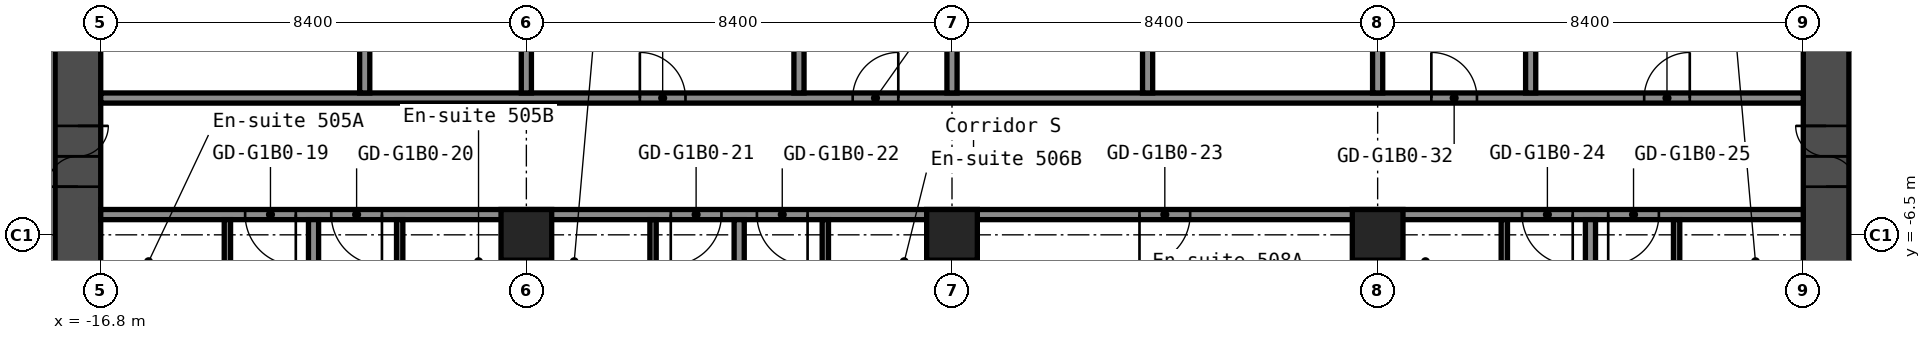
"""IFC4 building model, lengths in metres.
Left out: names, types, materials, properties, quantities, classifications, styles, units other than length and angle.
Written with IfcOpenShell. Run it as: python <this file> out.ifc"""

import sys

from ifc_helpers import new_model, si_unit, direction, frame, frame_2d, origin, origin_2d, place, context, subcontext, project, spatial, rectangle, hollow_rectangle, extrude, element, fill, save


model = new_model("IFC4")
c1 = context("Model", 3, precision=1e-05, world=origin(), true_north=direction((0.0, 1.0)))
c2 = subcontext(c1, "Body", "Model", "MODEL_VIEW")
j1 = project(units=[si_unit("LENGTHUNIT", "METRE"), si_unit("PLANEANGLEUNIT", "RADIAN")], contexts=[c1])
p1 = place(None, origin())
s1 = spatial("IfcSite", under=j1, at=p1, CompositionType="ELEMENT")
p2 = place(p1, origin())
s2 = spatial("IfcBuilding", under=s1, at=p2, CompositionType="ELEMENT")
p3 = place(p2, frame((0.0, 0.0, 23.0)))
s3 = spatial("IfcBuildingStorey", under=s2, at=p3, CompositionType="ELEMENT", Elevation=23.0)
for number, where, z_axis, x_axis in (
    (1, (-8.4, -6.5, 0.0), (0.0, 0.0, 1.0), (1.0, 0.0, 0.0)),
    (2, (0.0, -6.5, 0.0), (0.0, 0.0, 1.0), (1.0, 0.0, 0.0)),
    (3, (8.4, -6.5, 0.0), (0.0, 0.0, 1.0), (1.0, 0.0, 0.0)),
):
    element("IfcColumn", number, at=place(p3, frame(where, z_axis=z_axis, x_axis=x_axis)), inside=s3, PredefinedType="COLUMN", context=c2, shape_type="SweptSolid", body=[
        extrude(hollow_rectangle(XDim=1.0, YDim=1.0, WallThickness=0.04, at=origin_2d()), origin(), (0.0, 0.0, 1.0), 2.8),
    ])
p4 = place(p3, frame((-17.25, -8.4, 0.0), z_axis=(0.0, 0.0, 1.0), x_axis=(0.0, 1.0, 0.0)))
e4 = element("IfcWall", 4, at=p4, inside=s3, PredefinedType="SHEAR", context=c2, shape_type="SweptSolid", body=[
    extrude(rectangle(XDim=16.8, YDim=0.9, at=frame_2d((8.4, 0.0))), origin(), (0.0, 0.0, 1.0), 2.8),
])
p5 = place(p4, frame((12.75, 0.0, 0.0)))
e5 = element("IfcOpeningElement", 5, at=p5, cuts=e4, PredefinedType="OPENING", context=c2, shape_type="SweptSolid", body=[
    extrude(rectangle(XDim=1.2, YDim=2.1, at=frame_2d((0.6, 1.05))), frame((0.0, 0.46, 0.0), z_axis=(0.0, -1.0, 0.0), x_axis=(1.0, 0.0, 0.0)), (0.0, 0.0, 1.0), 0.92),
])
p6 = place(p4, frame((2.85, 0.0, 0.0)))
e6 = element("IfcOpeningElement", 6, at=p6, cuts=e4, PredefinedType="OPENING", context=c2, shape_type="SweptSolid", body=[
    extrude(rectangle(XDim=1.2, YDim=2.1, at=frame_2d((0.6, 1.05))), frame((0.0, 0.46, 0.0), z_axis=(0.0, -1.0, 0.0), x_axis=(1.0, 0.0, 0.0)), (0.0, 0.0, 1.0), 0.92),
])
p7 = place(p3, frame((17.25, -8.4, 0.0), z_axis=(0.0, 0.0, 1.0), x_axis=(0.0, 1.0, 0.0)))
e7 = element("IfcWall", 7, at=p7, inside=s3, PredefinedType="SHEAR", context=c2, shape_type="SweptSolid", body=[
    extrude(rectangle(XDim=16.8, YDim=0.9, at=frame_2d((8.4, 0.0))), origin(), (0.0, 0.0, 1.0), 2.8),
])
p8 = place(p7, frame((12.75, 0.0, 0.0)))
e8 = element("IfcOpeningElement", 8, at=p8, cuts=e7, PredefinedType="OPENING", context=c2, shape_type="SweptSolid", body=[
    extrude(rectangle(XDim=1.2, YDim=2.1, at=frame_2d((0.6, 1.05))), frame((0.0, 0.46, 0.0), z_axis=(0.0, -1.0, 0.0), x_axis=(1.0, 0.0, 0.0)), (0.0, 0.0, 1.0), 0.92),
])
p9 = place(p7, frame((2.85, 0.0, 0.0)))
e9 = element("IfcOpeningElement", 9, at=p9, cuts=e7, PredefinedType="OPENING", context=c2, shape_type="SweptSolid", body=[
    extrude(rectangle(XDim=1.2, YDim=2.1, at=frame_2d((0.6, 1.05))), frame((0.0, 0.46, 0.0), z_axis=(0.0, -1.0, 0.0), x_axis=(1.0, 0.0, 0.0)), (0.0, 0.0, 1.0), 0.92),
])
p10 = place(p3, frame((-16.8, -6.1, 0.0), z_axis=(0.0, 0.0, 1.0), x_axis=(1.0, 0.0, 0.0)))
e10 = element("IfcWall", 10, at=p10, inside=s3, PredefinedType="PARTITIONING", context=c2, shape_type="SweptSolid", body=[
    extrude(rectangle(XDim=33.6, YDim=0.2, at=frame_2d((16.8, 0.0))), origin(), (0.0, 0.0, 1.0), 2.8),
])
p11 = place(p10, frame((2.85, 0.0, 0.0)))
e11 = element("IfcOpeningElement", 11, at=p11, cuts=e10, PredefinedType="OPENING", context=c2, shape_type="SweptSolid", body=[
    extrude(rectangle(XDim=1.0, YDim=2.1, at=frame_2d((0.5, 1.05))), frame((0.0, 0.11, 0.0), z_axis=(0.0, -1.0, 0.0), x_axis=(1.0, 0.0, 0.0)), (0.0, 0.0, 1.0), 0.22),
])
p12 = place(p10, frame((4.55, 0.0, 0.0)))
e12 = element("IfcOpeningElement", 12, at=p12, cuts=e10, PredefinedType="OPENING", context=c2, shape_type="SweptSolid", body=[
    extrude(rectangle(XDim=1.0, YDim=2.1, at=frame_2d((0.5, 1.05))), frame((0.0, 0.11, 0.0), z_axis=(0.0, -1.0, 0.0), x_axis=(1.0, 0.0, 0.0)), (0.0, 0.0, 1.0), 0.22),
])
p13 = place(p10, frame((11.25, 0.0, 0.0)))
e13 = element("IfcOpeningElement", 13, at=p13, cuts=e10, PredefinedType="OPENING", context=c2, shape_type="SweptSolid", body=[
    extrude(rectangle(XDim=1.0, YDim=2.1, at=frame_2d((0.5, 1.05))), frame((0.0, 0.11, 0.0), z_axis=(0.0, -1.0, 0.0), x_axis=(1.0, 0.0, 0.0)), (0.0, 0.0, 1.0), 0.22),
])
p14 = place(p10, frame((12.95, 0.0, 0.0)))
e14 = element("IfcOpeningElement", 14, at=p14, cuts=e10, PredefinedType="OPENING", context=c2, shape_type="SweptSolid", body=[
    extrude(rectangle(XDim=1.0, YDim=2.1, at=frame_2d((0.5, 1.05))), frame((0.0, 0.11, 0.0), z_axis=(0.0, -1.0, 0.0), x_axis=(1.0, 0.0, 0.0)), (0.0, 0.0, 1.0), 0.22),
])
p15 = place(p10, frame((20.5, 0.0, 0.0)))
e15 = element("IfcOpeningElement", 15, at=p15, cuts=e10, PredefinedType="OPENING", context=c2, shape_type="SweptSolid", body=[
    extrude(rectangle(XDim=1.0, YDim=2.1, at=frame_2d((0.5, 1.05))), frame((0.0, 0.11, 0.0), z_axis=(0.0, -1.0, 0.0), x_axis=(1.0, 0.0, 0.0)), (0.0, 0.0, 1.0), 0.22),
])
p16 = place(p10, frame((28.05, 0.0, 0.0)))
e16 = element("IfcOpeningElement", 16, at=p16, cuts=e10, PredefinedType="OPENING", context=c2, shape_type="SweptSolid", body=[
    extrude(rectangle(XDim=1.0, YDim=2.1, at=frame_2d((0.5, 1.05))), frame((0.0, 0.11, 0.0), z_axis=(0.0, -1.0, 0.0), x_axis=(1.0, 0.0, 0.0)), (0.0, 0.0, 1.0), 0.22),
])
p17 = place(p10, frame((29.75, 0.0, 0.0)))
e17 = element("IfcOpeningElement", 17, at=p17, cuts=e10, PredefinedType="OPENING", context=c2, shape_type="SweptSolid", body=[
    extrude(rectangle(XDim=1.0, YDim=2.1, at=frame_2d((0.5, 1.05))), frame((0.0, 0.11, 0.0), z_axis=(0.0, -1.0, 0.0), x_axis=(1.0, 0.0, 0.0)), (0.0, 0.0, 1.0), 0.22),
])
p18 = place(p3, frame((-16.8, -3.8, 0.0), z_axis=(0.0, 0.0, 1.0), x_axis=(1.0, 0.0, 0.0)))
e18 = element("IfcWall", 18, at=p18, inside=s3, PredefinedType="PARTITIONING", context=c2, shape_type="SweptSolid", body=[
    extrude(rectangle(XDim=33.6, YDim=0.2, at=frame_2d((16.8, 0.0))), origin(), (0.0, 0.0, 1.0), 2.8),
])
p19 = place(p18, frame((10.64, 0.0, 0.0)))
e19 = element("IfcOpeningElement", 19, at=p19, cuts=e18, PredefinedType="OPENING", context=c2, shape_type="SweptSolid", body=[
    extrude(rectangle(XDim=0.9, YDim=2.1, at=frame_2d((0.45, 1.05))), frame((0.0, 0.11, 0.0), z_axis=(0.0, -1.0, 0.0), x_axis=(1.0, 0.0, 0.0)), (0.0, 0.0, 1.0), 0.22),
])
p20 = place(p18, frame((14.84, 0.0, 0.0)))
e20 = element("IfcOpeningElement", 20, at=p20, cuts=e18, PredefinedType="OPENING", context=c2, shape_type="SweptSolid", body=[
    extrude(rectangle(XDim=0.9, YDim=2.1, at=frame_2d((0.45, 1.05))), frame((0.0, 0.11, 0.0), z_axis=(0.0, -1.0, 0.0), x_axis=(1.0, 0.0, 0.0)), (0.0, 0.0, 1.0), 0.22),
])
p21 = place(p18, frame((26.26, 0.0, 0.0)))
e21 = element("IfcOpeningElement", 21, at=p21, cuts=e18, PredefinedType="OPENING", context=c2, shape_type="SweptSolid", body=[
    extrude(rectangle(XDim=0.9, YDim=2.1, at=frame_2d((0.45, 1.05))), frame((0.0, 0.11, 0.0), z_axis=(0.0, -1.0, 0.0), x_axis=(1.0, 0.0, 0.0)), (0.0, 0.0, 1.0), 0.22),
])
p22 = place(p18, frame((30.46, 0.0, 0.0)))
e22 = element("IfcOpeningElement", 22, at=p22, cuts=e18, PredefinedType="OPENING", context=c2, shape_type="SweptSolid", body=[
    extrude(rectangle(XDim=0.9, YDim=2.1, at=frame_2d((0.45, 1.05))), frame((0.0, 0.11, 0.0), z_axis=(0.0, -1.0, 0.0), x_axis=(1.0, 0.0, 0.0)), (0.0, 0.0, 1.0), 0.22),
])
p23 = place(p3, frame((-14.3, -9.1, 0.0), z_axis=(0.0, 0.0, 1.0), x_axis=(0.0, 1.0, 0.0)))
e23 = element("IfcWall", 23, at=p23, inside=s3, PredefinedType="PARTITIONING", context=c2, shape_type="SweptSolid", body=[
    extrude(rectangle(XDim=2.9, YDim=0.125, at=frame_2d((1.45, 0.0))), origin(), (0.0, 0.0, 1.0), 2.8),
])
p24 = place(p23, frame((0.6, 0.0, 0.0)))
e24 = element("IfcOpeningElement", 24, at=p24, cuts=e23, PredefinedType="OPENING", context=c2, shape_type="SweptSolid", body=[
    extrude(rectangle(XDim=0.8, YDim=2.1, at=frame_2d((0.4, 1.05))), frame((0.0, 0.073, 0.0), z_axis=(0.0, -1.0, 0.0), x_axis=(1.0, 0.0, 0.0)), (0.0, 0.0, 1.0), 0.145),
])
p25 = place(p3, frame((-12.6, -20.3, 0.0), z_axis=(0.0, 0.0, 1.0), x_axis=(0.0, 1.0, 0.0)))
e25 = element("IfcWall", 25, at=p25, inside=s3, PredefinedType="PARTITIONING", context=c2, shape_type="SweptSolid", body=[
    extrude(rectangle(XDim=14.1, YDim=0.2, at=frame_2d((7.05, 0.0))), origin(), (0.0, 0.0, 1.0), 2.8),
])
p26 = place(p3, frame((-11.59, -3.7, 0.0), z_axis=(0.0, 0.0, 1.0), x_axis=(0.0, 1.0, 0.0)))
e26 = element("IfcWall", 26, at=p26, inside=s3, PredefinedType="PARTITIONING", context=c2, shape_type="SweptSolid", body=[
    extrude(rectangle(XDim=7.4, YDim=0.2, at=frame_2d((3.7, 0.0))), origin(), (0.0, 0.0, 1.0), 2.8),
])
p27 = place(p3, frame((-10.9, -9.1, 0.0), z_axis=(0.0, 0.0, 1.0), x_axis=(0.0, 1.0, 0.0)))
e27 = element("IfcWall", 27, at=p27, inside=s3, PredefinedType="PARTITIONING", context=c2, shape_type="SweptSolid", body=[
    extrude(rectangle(XDim=2.9, YDim=0.125, at=frame_2d((1.45, 0.0))), origin(), (0.0, 0.0, 1.0), 2.8),
])
p28 = place(p27, frame((0.6, 0.0, 0.0)))
e28 = element("IfcOpeningElement", 28, at=p28, cuts=e27, PredefinedType="OPENING", context=c2, shape_type="SweptSolid", body=[
    extrude(rectangle(XDim=0.8, YDim=2.1, at=frame_2d((0.4, 1.05))), frame((0.0, 0.073, 0.0), z_axis=(0.0, -1.0, 0.0), x_axis=(1.0, 0.0, 0.0)), (0.0, 0.0, 1.0), 0.145),
])
p29 = place(p3, frame((-8.4, -20.3, 0.0), z_axis=(0.0, 0.0, 1.0), x_axis=(0.0, 1.0, 0.0)))
e29 = element("IfcWall", 29, at=p29, inside=s3, PredefinedType="PARTITIONING", context=c2, shape_type="SweptSolid", body=[
    extrude(rectangle(XDim=13.31, YDim=0.2, at=frame_2d((6.655, 0.0))), origin(), (0.0, 0.0, 1.0), 2.8),
])
p30 = place(p3, frame((-8.4, -3.7, 0.0), z_axis=(0.0, 0.0, 1.0), x_axis=(0.0, 1.0, 0.0)))
e30 = element("IfcWall", 30, at=p30, inside=s3, PredefinedType="PARTITIONING", context=c2, shape_type="SweptSolid", body=[
    extrude(rectangle(XDim=7.4, YDim=0.2, at=frame_2d((3.7, 0.0))), origin(), (0.0, 0.0, 1.0), 2.8),
])
p31 = place(p3, frame((-5.9, -9.1, 0.0), z_axis=(0.0, 0.0, 1.0), x_axis=(0.0, 1.0, 0.0)))
e31 = element("IfcWall", 31, at=p31, inside=s3, PredefinedType="PARTITIONING", context=c2, shape_type="SweptSolid", body=[
    extrude(rectangle(XDim=2.9, YDim=0.125, at=frame_2d((1.45, 0.0))), origin(), (0.0, 0.0, 1.0), 2.8),
])
p32 = place(p31, frame((0.6, 0.0, 0.0)))
e32 = element("IfcOpeningElement", 32, at=p32, cuts=e31, PredefinedType="OPENING", context=c2, shape_type="SweptSolid", body=[
    extrude(rectangle(XDim=0.8, YDim=2.1, at=frame_2d((0.4, 1.05))), frame((0.0, 0.073, 0.0), z_axis=(0.0, -1.0, 0.0), x_axis=(1.0, 0.0, 0.0)), (0.0, 0.0, 1.0), 0.145),
])
p33 = place(p3, frame((-4.2, -20.3, 0.0), z_axis=(0.0, 0.0, 1.0), x_axis=(0.0, 1.0, 0.0)))
e33 = element("IfcWall", 33, at=p33, inside=s3, PredefinedType="PARTITIONING", context=c2, shape_type="SweptSolid", body=[
    extrude(rectangle(XDim=14.1, YDim=0.2, at=frame_2d((7.05, 0.0))), origin(), (0.0, 0.0, 1.0), 2.8),
])
p34 = place(p3, frame((-3.02, -3.7, 0.0), z_axis=(0.0, 0.0, 1.0), x_axis=(0.0, 1.0, 0.0)))
e34 = element("IfcWall", 34, at=p34, inside=s3, PredefinedType="PARTITIONING", context=c2, shape_type="SweptSolid", body=[
    extrude(rectangle(XDim=7.4, YDim=0.2, at=frame_2d((3.7, 0.0))), origin(), (0.0, 0.0, 1.0), 2.8),
])
p35 = place(p3, frame((-2.5, -9.1, 0.0), z_axis=(0.0, 0.0, 1.0), x_axis=(0.0, 1.0, 0.0)))
e35 = element("IfcWall", 35, at=p35, inside=s3, PredefinedType="PARTITIONING", context=c2, shape_type="SweptSolid", body=[
    extrude(rectangle(XDim=2.9, YDim=0.125, at=frame_2d((1.45, 0.0))), origin(), (0.0, 0.0, 1.0), 2.8),
])
p36 = place(p35, frame((0.6, 0.0, 0.0)))
e36 = element("IfcOpeningElement", 36, at=p36, cuts=e35, PredefinedType="OPENING", context=c2, shape_type="SweptSolid", body=[
    extrude(rectangle(XDim=0.8, YDim=2.1, at=frame_2d((0.4, 1.05))), frame((0.0, 0.073, 0.0), z_axis=(0.0, -1.0, 0.0), x_axis=(1.0, 0.0, 0.0)), (0.0, 0.0, 1.0), 0.145),
])
p37 = place(p3, frame((0.0, -20.3, 0.0), z_axis=(0.0, 0.0, 1.0), x_axis=(0.0, 1.0, 0.0)))
e37 = element("IfcWall", 37, at=p37, inside=s3, PredefinedType="PARTITIONING", context=c2, shape_type="SweptSolid", body=[
    extrude(rectangle(XDim=13.31, YDim=0.2, at=frame_2d((6.655, 0.0))), origin(), (0.0, 0.0, 1.0), 2.8),
])
for number, where, z_axis, x_axis in (
    (38, (0.0, -3.7, 0.0), (0.0, 0.0, 1.0), (0.0, 1.0, 0.0)),
    (39, (3.86, -3.7, 0.0), (0.0, 0.0, 1.0), (0.0, 1.0, 0.0)),
):
    element("IfcWall", number, at=place(p3, frame(where, z_axis=z_axis, x_axis=x_axis)), inside=s3, PredefinedType="PARTITIONING", context=c2, shape_type="SweptSolid", body=[
        extrude(rectangle(XDim=7.4, YDim=0.2, at=frame_2d((3.7, 0.0))), origin(), (0.0, 0.0, 1.0), 2.8),
    ])
p38 = place(p3, frame((8.4, -20.3, 0.0), z_axis=(0.0, 0.0, 1.0), x_axis=(0.0, 1.0, 0.0)))
e40 = element("IfcWall", 40, at=p38, inside=s3, PredefinedType="PARTITIONING", context=c2, shape_type="SweptSolid", body=[
    extrude(rectangle(XDim=13.31, YDim=0.2, at=frame_2d((6.655, 0.0))), origin(), (0.0, 0.0, 1.0), 2.8),
])
p39 = place(p3, frame((8.4, -3.7, 0.0), z_axis=(0.0, 0.0, 1.0), x_axis=(0.0, 1.0, 0.0)))
e41 = element("IfcWall", 41, at=p39, inside=s3, PredefinedType="PARTITIONING", context=c2, shape_type="SweptSolid", body=[
    extrude(rectangle(XDim=7.4, YDim=0.2, at=frame_2d((3.7, 0.0))), origin(), (0.0, 0.0, 1.0), 2.8),
])
p40 = place(p3, frame((10.9, -9.1, 0.0), z_axis=(0.0, 0.0, 1.0), x_axis=(0.0, 1.0, 0.0)))
e42 = element("IfcWall", 42, at=p40, inside=s3, PredefinedType="PARTITIONING", context=c2, shape_type="SweptSolid", body=[
    extrude(rectangle(XDim=2.9, YDim=0.125, at=frame_2d((1.45, 0.0))), origin(), (0.0, 0.0, 1.0), 2.8),
])
p41 = place(p40, frame((0.6, 0.0, 0.0)))
e43 = element("IfcOpeningElement", 43, at=p41, cuts=e42, PredefinedType="OPENING", context=c2, shape_type="SweptSolid", body=[
    extrude(rectangle(XDim=0.8, YDim=2.1, at=frame_2d((0.4, 1.05))), frame((0.0, 0.073, 0.0), z_axis=(0.0, -1.0, 0.0), x_axis=(1.0, 0.0, 0.0)), (0.0, 0.0, 1.0), 0.145),
])
p42 = place(p3, frame((11.42, -3.7, 0.0), z_axis=(0.0, 0.0, 1.0), x_axis=(0.0, 1.0, 0.0)))
e44 = element("IfcWall", 44, at=p42, inside=s3, PredefinedType="PARTITIONING", context=c2, shape_type="SweptSolid", body=[
    extrude(rectangle(XDim=7.4, YDim=0.2, at=frame_2d((3.7, 0.0))), origin(), (0.0, 0.0, 1.0), 2.8),
])
p43 = place(p3, frame((12.6, -20.3, 0.0), z_axis=(0.0, 0.0, 1.0), x_axis=(0.0, 1.0, 0.0)))
e45 = element("IfcWall", 45, at=p43, inside=s3, PredefinedType="PARTITIONING", context=c2, shape_type="SweptSolid", body=[
    extrude(rectangle(XDim=14.1, YDim=0.2, at=frame_2d((7.05, 0.0))), origin(), (0.0, 0.0, 1.0), 2.8),
])
p44 = place(p3, frame((14.3, -9.1, 0.0), z_axis=(0.0, 0.0, 1.0), x_axis=(0.0, 1.0, 0.0)))
e46 = element("IfcWall", 46, at=p44, inside=s3, PredefinedType="PARTITIONING", context=c2, shape_type="SweptSolid", body=[
    extrude(rectangle(XDim=2.9, YDim=0.125, at=frame_2d((1.45, 0.0))), origin(), (0.0, 0.0, 1.0), 2.8),
])
p45 = place(p44, frame((0.6, 0.0, 0.0)))
e47 = element("IfcOpeningElement", 47, at=p45, cuts=e46, PredefinedType="OPENING", context=c2, shape_type="SweptSolid", body=[
    extrude(rectangle(XDim=0.8, YDim=2.1, at=frame_2d((0.4, 1.05))), frame((0.0, 0.073, 0.0), z_axis=(0.0, -1.0, 0.0), x_axis=(1.0, 0.0, 0.0)), (0.0, 0.0, 1.0), 0.145),
])
p46 = place(p6, origin())
e48 = element("IfcDoor", 48, at=p46, inside=s3, OperationType="DOUBLE_DOOR_SINGLE_SWING", PredefinedType="DOOR", context=c2, shape_type="SweptSolid", body=[
    extrude(rectangle(XDim=1.2, YDim=2.1, at=frame_2d((0.6, 1.05))), frame((0.0, 0.025, 0.0), z_axis=(0.0, -1.0, 0.0), x_axis=(1.0, 0.0, 0.0)), (0.0, 0.0, 1.0), 0.05),
])
fill(e6, e48)
p47 = place(p9, origin())
e49 = element("IfcDoor", 49, at=p47, inside=s3, OperationType="DOUBLE_DOOR_SINGLE_SWING", PredefinedType="DOOR", context=c2, shape_type="SweptSolid", body=[
    extrude(rectangle(XDim=1.2, YDim=2.1, at=frame_2d((0.6, 1.05))), frame((0.0, 0.025, 0.0), z_axis=(0.0, -1.0, 0.0), x_axis=(1.0, 0.0, 0.0)), (0.0, 0.0, 1.0), 0.05),
])
fill(e9, e49)
p48 = place(p11, origin())
e50 = element("IfcDoor", 50, at=p48, inside=s3, OperationType="SINGLE_SWING_RIGHT", PredefinedType="DOOR", context=c2, shape_type="SweptSolid", body=[
    extrude(rectangle(XDim=1.0, YDim=2.1, at=frame_2d((0.5, 1.05))), frame((0.0, 0.025, 0.0), z_axis=(0.0, -1.0, 0.0), x_axis=(1.0, 0.0, 0.0)), (0.0, 0.0, 1.0), 0.05),
])
fill(e11, e50)
p49 = place(p12, origin())
e51 = element("IfcDoor", 51, at=p49, inside=s3, OperationType="SINGLE_SWING_RIGHT", PredefinedType="DOOR", context=c2, shape_type="SweptSolid", body=[
    extrude(rectangle(XDim=1.0, YDim=2.1, at=frame_2d((0.5, 1.05))), frame((0.0, 0.025, 0.0), z_axis=(0.0, -1.0, 0.0), x_axis=(1.0, 0.0, 0.0)), (0.0, 0.0, 1.0), 0.05),
])
fill(e12, e51)
p50 = place(p13, origin())
e52 = element("IfcDoor", 52, at=p50, inside=s3, OperationType="SINGLE_SWING_LEFT", PredefinedType="DOOR", context=c2, shape_type="SweptSolid", body=[
    extrude(rectangle(XDim=1.0, YDim=2.1, at=frame_2d((0.5, 1.05))), frame((0.0, 0.025, 0.0), z_axis=(0.0, -1.0, 0.0), x_axis=(1.0, 0.0, 0.0)), (0.0, 0.0, 1.0), 0.05),
])
fill(e13, e52)
p51 = place(p14, origin())
e53 = element("IfcDoor", 53, at=p51, inside=s3, OperationType="SINGLE_SWING_RIGHT", PredefinedType="DOOR", context=c2, shape_type="SweptSolid", body=[
    extrude(rectangle(XDim=1.0, YDim=2.1, at=frame_2d((0.5, 1.05))), frame((0.0, 0.025, 0.0), z_axis=(0.0, -1.0, 0.0), x_axis=(1.0, 0.0, 0.0)), (0.0, 0.0, 1.0), 0.05),
])
fill(e14, e53)
p52 = place(p15, origin())
e54 = element("IfcDoor", 54, at=p52, inside=s3, OperationType="SINGLE_SWING_LEFT", PredefinedType="DOOR", context=c2, shape_type="SweptSolid", body=[
    extrude(rectangle(XDim=1.0, YDim=2.1, at=frame_2d((0.5, 1.05))), frame((0.0, 0.025, 0.0), z_axis=(0.0, -1.0, 0.0), x_axis=(1.0, 0.0, 0.0)), (0.0, 0.0, 1.0), 0.05),
])
fill(e15, e54)
p53 = place(p16, origin())
e55 = element("IfcDoor", 55, at=p53, inside=s3, OperationType="SINGLE_SWING_RIGHT", PredefinedType="DOOR", context=c2, shape_type="SweptSolid", body=[
    extrude(rectangle(XDim=1.0, YDim=2.1, at=frame_2d((0.5, 1.05))), frame((0.0, 0.025, 0.0), z_axis=(0.0, -1.0, 0.0), x_axis=(1.0, 0.0, 0.0)), (0.0, 0.0, 1.0), 0.05),
])
fill(e16, e55)
p54 = place(p17, origin())
e56 = element("IfcDoor", 56, at=p54, inside=s3, OperationType="SINGLE_SWING_LEFT", PredefinedType="DOOR", context=c2, shape_type="SweptSolid", body=[
    extrude(rectangle(XDim=1.0, YDim=2.1, at=frame_2d((0.5, 1.05))), frame((0.0, 0.025, 0.0), z_axis=(0.0, -1.0, 0.0), x_axis=(1.0, 0.0, 0.0)), (0.0, 0.0, 1.0), 0.05),
])
fill(e17, e56)
p55 = place(p19, origin())
e57 = element("IfcDoor", 57, at=p55, inside=s3, OperationType="SINGLE_SWING_RIGHT", PredefinedType="DOOR", context=c2, shape_type="SweptSolid", body=[
    extrude(rectangle(XDim=0.9, YDim=2.1, at=frame_2d((0.45, 1.05))), frame((0.0, 0.025, 0.0), z_axis=(0.0, -1.0, 0.0), x_axis=(1.0, 0.0, 0.0)), (0.0, 0.0, 1.0), 0.05),
])
fill(e19, e57)
p56 = place(p20, origin())
e58 = element("IfcDoor", 58, at=p56, inside=s3, OperationType="SINGLE_SWING_LEFT", PredefinedType="DOOR", context=c2, shape_type="SweptSolid", body=[
    extrude(rectangle(XDim=0.9, YDim=2.1, at=frame_2d((0.45, 1.05))), frame((0.0, 0.025, 0.0), z_axis=(0.0, -1.0, 0.0), x_axis=(1.0, 0.0, 0.0)), (0.0, 0.0, 1.0), 0.05),
])
fill(e20, e58)
p57 = place(p21, origin())
e59 = element("IfcDoor", 59, at=p57, inside=s3, OperationType="SINGLE_SWING_RIGHT", PredefinedType="DOOR", context=c2, shape_type="SweptSolid", body=[
    extrude(rectangle(XDim=0.9, YDim=2.1, at=frame_2d((0.45, 1.05))), frame((0.0, 0.025, 0.0), z_axis=(0.0, -1.0, 0.0), x_axis=(1.0, 0.0, 0.0)), (0.0, 0.0, 1.0), 0.05),
])
fill(e21, e59)
p58 = place(p22, origin())
e60 = element("IfcDoor", 60, at=p58, inside=s3, OperationType="SINGLE_SWING_LEFT", PredefinedType="DOOR", context=c2, shape_type="SweptSolid", body=[
    extrude(rectangle(XDim=0.9, YDim=2.1, at=frame_2d((0.45, 1.05))), frame((0.0, 0.025, 0.0), z_axis=(0.0, -1.0, 0.0), x_axis=(1.0, 0.0, 0.0)), (0.0, 0.0, 1.0), 0.05),
])
fill(e22, e60)
save(model, sys.argv[1])
